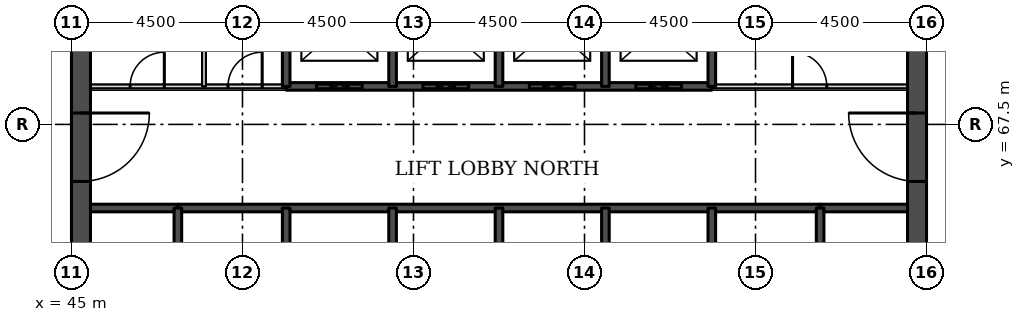
"""IFC4 building model, lengths in metres.
Left out: names, types, materials, properties, quantities, classifications, styles, units other than length and angle.
Written with IfcOpenShell. Run it as: python <this file> out.ifc"""

import sys

from ifc_helpers import new_model, si_unit, direction, frame, frame_2d, origin, place, context, subcontext, project, spatial, rectangle, extrude, element, fill, save


model = new_model("IFC4")
c1 = context("Model", 3, precision=1e-05, world=origin(), true_north=direction((0.0, 1.0)))
c2 = subcontext(c1, "Body", "Model", "MODEL_VIEW")
j1 = project(units=[si_unit("LENGTHUNIT", "METRE"), si_unit("PLANEANGLEUNIT", "RADIAN")], contexts=[c1])
p1 = place(None, origin())
s1 = spatial("IfcSite", under=j1, at=p1, CompositionType="ELEMENT")
p2 = place(p1, origin())
s2 = spatial("IfcBuilding", under=s1, at=p2, CompositionType="ELEMENT")
p3 = place(p2, frame((0.0, 0.0, 18.5)))
s3 = spatial("IfcBuildingStorey", under=s2, at=p3, CompositionType="ELEMENT", Elevation=18.5)
p4 = place(p3, frame((45.25, 49.5, 0.0), z_axis=(0.0, 0.0, 1.0), x_axis=(0.0, 1.0, 0.0)))
e1 = element("IfcWall", 1, at=p4, inside=s3, PredefinedType="SHEAR", context=c2, shape_type="SweptSolid", body=[
    extrude(rectangle(XDim=22.5, YDim=0.5, at=frame_2d((11.25, 0.0))), origin(), (0.0, 0.0, 1.0), 4.6),
])
p5 = place(p4, frame((4.2, 0.0, 0.0)))
e2 = element("IfcOpeningElement", 2, at=p5, cuts=e1, PredefinedType="OPENING", context=c2, shape_type="SweptSolid", body=[
    extrude(rectangle(XDim=1.8, YDim=2.1, at=frame_2d((0.9, 1.05))), frame((0.0, 0.26, 0.0), z_axis=(0.0, -1.0, 0.0), x_axis=(1.0, 0.0, 0.0)), (0.0, 0.0, 1.0), 0.52),
])
p6 = place(p4, frame((6.9, 0.0, 0.0)))
e3 = element("IfcOpeningElement", 3, at=p6, cuts=e1, PredefinedType="OPENING", context=c2, shape_type="SweptSolid", body=[
    extrude(rectangle(XDim=1.1, YDim=2.1, at=frame_2d((0.55, 1.05))), frame((0.0, 0.26, 0.0), z_axis=(0.0, -1.0, 0.0), x_axis=(1.0, 0.0, 0.0)), (0.0, 0.0, 1.0), 0.52),
])
p7 = place(p4, frame((13.6, 0.0, 0.0)))
e4 = element("IfcOpeningElement", 4, at=p7, cuts=e1, PredefinedType="OPENING", context=c2, shape_type="SweptSolid", body=[
    extrude(rectangle(XDim=1.1, YDim=2.1, at=frame_2d((0.55, 1.05))), frame((0.0, 0.26, 0.0), z_axis=(0.0, -1.0, 0.0), x_axis=(1.0, 0.0, 0.0)), (0.0, 0.0, 1.0), 0.52),
])
p8 = place(p4, frame((16.5, 0.0, 0.0)))
e5 = element("IfcOpeningElement", 5, at=p8, cuts=e1, PredefinedType="OPENING", context=c2, shape_type="SweptSolid", body=[
    extrude(rectangle(XDim=1.8, YDim=2.1, at=frame_2d((0.9, 1.05))), frame((0.0, 0.26, 0.0), z_axis=(0.0, -1.0, 0.0), x_axis=(1.0, 0.0, 0.0)), (0.0, 0.0, 1.0), 0.52),
])
p9 = place(p3, frame((67.25, 49.5, 0.0), z_axis=(0.0, 0.0, 1.0), x_axis=(0.0, 1.0, 0.0)))
e6 = element("IfcWall", 6, at=p9, inside=s3, PredefinedType="SHEAR", context=c2, shape_type="SweptSolid", body=[
    extrude(rectangle(XDim=22.5, YDim=0.5, at=frame_2d((11.25, 0.0))), origin(), (0.0, 0.0, 1.0), 4.6),
])
p10 = place(p9, frame((4.2, 0.0, 0.0)))
e7 = element("IfcOpeningElement", 7, at=p10, cuts=e6, PredefinedType="OPENING", context=c2, shape_type="SweptSolid", body=[
    extrude(rectangle(XDim=1.8, YDim=2.1, at=frame_2d((0.9, 1.05))), frame((0.0, 0.26, 0.0), z_axis=(0.0, -1.0, 0.0), x_axis=(1.0, 0.0, 0.0)), (0.0, 0.0, 1.0), 0.52),
])
p11 = place(p9, frame((6.9, 0.0, 0.0)))
e8 = element("IfcOpeningElement", 8, at=p11, cuts=e6, PredefinedType="OPENING", context=c2, shape_type="SweptSolid", body=[
    extrude(rectangle(XDim=1.1, YDim=2.1, at=frame_2d((0.55, 1.05))), frame((0.0, 0.26, 0.0), z_axis=(0.0, -1.0, 0.0), x_axis=(1.0, 0.0, 0.0)), (0.0, 0.0, 1.0), 0.52),
])
p12 = place(p9, frame((13.6, 0.0, 0.0)))
e9 = element("IfcOpeningElement", 9, at=p12, cuts=e6, PredefinedType="OPENING", context=c2, shape_type="SweptSolid", body=[
    extrude(rectangle(XDim=1.1, YDim=2.1, at=frame_2d((0.55, 1.05))), frame((0.0, 0.26, 0.0), z_axis=(0.0, -1.0, 0.0), x_axis=(1.0, 0.0, 0.0)), (0.0, 0.0, 1.0), 0.52),
])
p13 = place(p9, frame((16.5, 0.0, 0.0)))
e10 = element("IfcOpeningElement", 10, at=p13, cuts=e6, PredefinedType="OPENING", context=c2, shape_type="SweptSolid", body=[
    extrude(rectangle(XDim=1.8, YDim=2.1, at=frame_2d((0.9, 1.05))), frame((0.0, 0.26, 0.0), z_axis=(0.0, -1.0, 0.0), x_axis=(1.0, 0.0, 0.0)), (0.0, 0.0, 1.0), 0.52),
])
for number, where, z_axis, x_axis in (
    (11, (45.5, 65.3, 0.0), (0.0, 0.0, 1.0), (1.0, 0.0, 0.0)),
    (12, (64.7, 65.3, 0.0), (0.0, 0.0, 1.0), (1.0, 0.0, 0.0)),
):
    element("IfcWall", number, at=place(p3, frame(where, z_axis=z_axis, x_axis=x_axis)), inside=s3, PredefinedType="SOLIDWALL", context=c2, shape_type="SweptSolid", body=[
        extrude(rectangle(XDim=2.3, YDim=0.2, at=frame_2d((1.15, 0.0))), origin(), (0.0, 0.0, 1.0), 4.38),
    ])
p14 = place(p3, frame((47.8, 65.3, 0.0), z_axis=(0.0, 0.0, 1.0), x_axis=(1.0, 0.0, 0.0)))
e13 = element("IfcWall", 13, at=p14, inside=s3, PredefinedType="SOLIDWALL", context=c2, shape_type="SweptSolid", body=[
    extrude(rectangle(XDim=16.9, YDim=0.2, at=frame_2d((8.45, 0.0))), origin(), (0.0, 0.0, 1.0), 4.38),
])
p15 = place(p3, frame((45.5, 68.5, 0.0), z_axis=(0.0, 0.0, 1.0), x_axis=(1.0, 0.0, 0.0)))
e14 = element("IfcWall", 14, at=p15, inside=s3, PredefinedType="PARTITIONING", context=c2, shape_type="SweptSolid", body=[
    extrude(rectangle(XDim=5.15, YDim=0.1, at=frame_2d((2.575, 0.0))), origin(), (0.0, 0.0, 1.0), 4.38),
])
p16 = place(p15, frame((1.043, 0.0, 0.0)))
e15 = element("IfcOpeningElement", 15, at=p16, cuts=e14, PredefinedType="OPENING", context=c2, shape_type="SweptSolid", body=[
    extrude(rectangle(XDim=0.9, YDim=2.1, at=frame_2d((0.45, 1.05))), frame((0.0, 0.06, 0.0), z_axis=(0.0, -1.0, 0.0), x_axis=(1.0, 0.0, 0.0)), (0.0, 0.0, 1.0), 0.12),
])
p17 = place(p15, frame((3.618, 0.0, 0.0)))
e16 = element("IfcOpeningElement", 16, at=p17, cuts=e14, PredefinedType="OPENING", context=c2, shape_type="SweptSolid", body=[
    extrude(rectangle(XDim=0.9, YDim=2.1, at=frame_2d((0.45, 1.05))), frame((0.0, 0.06, 0.0), z_axis=(0.0, -1.0, 0.0), x_axis=(1.0, 0.0, 0.0)), (0.0, 0.0, 1.0), 0.12),
])
p18 = place(p3, frame((61.85, 68.5, 0.0), z_axis=(0.0, 0.0, 1.0), x_axis=(1.0, 0.0, 0.0)))
e17 = element("IfcWall", 17, at=p18, inside=s3, PredefinedType="PARTITIONING", context=c2, shape_type="SweptSolid", body=[
    extrude(rectangle(XDim=5.15, YDim=0.1, at=frame_2d((2.575, 0.0))), origin(), (0.0, 0.0, 1.0), 4.38),
])
p19 = place(p18, frame((2.125, 0.0, 0.0)))
e18 = element("IfcOpeningElement", 18, at=p19, cuts=e17, PredefinedType="OPENING", context=c2, shape_type="SweptSolid", body=[
    extrude(rectangle(XDim=0.9, YDim=2.1, at=frame_2d((0.45, 1.05))), frame((0.0, 0.06, 0.0), z_axis=(0.0, -1.0, 0.0), x_axis=(1.0, 0.0, 0.0)), (0.0, 0.0, 1.0), 0.12),
])
p20 = place(p3, frame((50.65, 68.5, 0.0), z_axis=(0.0, 0.0, 1.0), x_axis=(1.0, 0.0, 0.0)))
e19 = element("IfcWall", 19, at=p20, inside=s3, PredefinedType="SOLIDWALL", context=c2, shape_type="SweptSolid", body=[
    extrude(rectangle(XDim=11.2, YDim=0.2, at=frame_2d((5.6, 0.0))), origin(), (0.0, 0.0, 1.0), 4.38),
])
p21 = place(p20, frame((0.8, 0.0, 0.0)))
e20 = element("IfcOpeningElement", 20, at=p21, cuts=e19, PredefinedType="OPENING", context=c2, shape_type="SweptSolid", body=[
    extrude(rectangle(XDim=1.2, YDim=2.1, at=frame_2d((0.6, 1.05))), frame((0.0, 0.11, 0.0), z_axis=(0.0, -1.0, 0.0), x_axis=(1.0, 0.0, 0.0)), (0.0, 0.0, 1.0), 0.22),
])
p22 = place(p20, frame((3.6, 0.0, 0.0)))
e21 = element("IfcOpeningElement", 21, at=p22, cuts=e19, PredefinedType="OPENING", context=c2, shape_type="SweptSolid", body=[
    extrude(rectangle(XDim=1.2, YDim=2.1, at=frame_2d((0.6, 1.05))), frame((0.0, 0.11, 0.0), z_axis=(0.0, -1.0, 0.0), x_axis=(1.0, 0.0, 0.0)), (0.0, 0.0, 1.0), 0.22),
])
p23 = place(p20, frame((6.4, 0.0, 0.0)))
e22 = element("IfcOpeningElement", 22, at=p23, cuts=e19, PredefinedType="OPENING", context=c2, shape_type="SweptSolid", body=[
    extrude(rectangle(XDim=1.2, YDim=2.1, at=frame_2d((0.6, 1.05))), frame((0.0, 0.11, 0.0), z_axis=(0.0, -1.0, 0.0), x_axis=(1.0, 0.0, 0.0)), (0.0, 0.0, 1.0), 0.22),
])
p24 = place(p20, frame((9.2, 0.0, 0.0)))
e23 = element("IfcOpeningElement", 23, at=p24, cuts=e19, PredefinedType="OPENING", context=c2, shape_type="SweptSolid", body=[
    extrude(rectangle(XDim=1.2, YDim=2.1, at=frame_2d((0.6, 1.05))), frame((0.0, 0.11, 0.0), z_axis=(0.0, -1.0, 0.0), x_axis=(1.0, 0.0, 0.0)), (0.0, 0.0, 1.0), 0.22),
])
p25 = place(p3, frame((47.8, 62.0, 0.0), z_axis=(0.0, 0.0, 1.0), x_axis=(0.0, 1.0, 0.0)))
e24 = element("IfcWall", 24, at=p25, inside=s3, PredefinedType="SOLIDWALL", context=c2, shape_type="SweptSolid", body=[
    extrude(rectangle(XDim=3.3, YDim=0.2, at=frame_2d((1.65, 0.0))), origin(), (0.0, 0.0, 1.0), 4.38),
])
p26 = place(p25, frame((1.1, 0.0, 0.0)))
e25 = element("IfcOpeningElement", 25, at=p26, cuts=e24, PredefinedType="OPENING", context=c2, shape_type="SweptSolid", body=[
    extrude(rectangle(XDim=1.1, YDim=2.1, at=frame_2d((0.55, 1.05))), frame((0.0, 0.11, 0.0), z_axis=(0.0, -1.0, 0.0), x_axis=(1.0, 0.0, 0.0)), (0.0, 0.0, 1.0), 0.22),
])
p27 = place(p3, frame((48.487, 68.5, 0.0), z_axis=(0.0, 0.0, 1.0), x_axis=(0.0, 1.0, 0.0)))
e26 = element("IfcWall", 26, at=p27, inside=s3, PredefinedType="PARTITIONING", context=c2, shape_type="SweptSolid", body=[
    extrude(rectangle(XDim=3.0, YDim=0.1, at=frame_2d((1.5, 0.0))), origin(), (0.0, 0.0, 1.0), 4.38),
])
p28 = place(p3, frame((50.65, 62.0, 0.0), z_axis=(0.0, 0.0, 1.0), x_axis=(0.0, 1.0, 0.0)))
e27 = element("IfcWall", 27, at=p28, inside=s3, PredefinedType="SOLIDWALL", context=c2, shape_type="SweptSolid", body=[
    extrude(rectangle(XDim=3.3, YDim=0.2, at=frame_2d((1.65, 0.0))), origin(), (0.0, 0.0, 1.0), 4.38),
])
p29 = place(p3, frame((50.65, 68.5, 0.0), z_axis=(0.0, 0.0, 1.0), x_axis=(0.0, 1.0, 0.0)))
e28 = element("IfcWall", 28, at=p29, inside=s3, PredefinedType="SOLIDWALL", context=c2, shape_type="SweptSolid", body=[
    extrude(rectangle(XDim=3.0, YDim=0.2, at=frame_2d((1.5, 0.0))), origin(), (0.0, 0.0, 1.0), 4.38),
])
p30 = place(p3, frame((53.45, 62.5, 0.0), z_axis=(0.0, 0.0, 1.0), x_axis=(0.0, 1.0, 0.0)))
e29 = element("IfcWall", 29, at=p30, inside=s3, PredefinedType="SOLIDWALL", context=c2, shape_type="SweptSolid", body=[
    extrude(rectangle(XDim=2.8, YDim=0.2, at=frame_2d((1.4, 0.0))), origin(), (0.0, 0.0, 1.0), 4.38),
])
p31 = place(p3, frame((53.45, 68.5, 0.0), z_axis=(0.0, 0.0, 1.0), x_axis=(0.0, 1.0, 0.0)))
e30 = element("IfcWall", 30, at=p31, inside=s3, PredefinedType="SOLIDWALL", context=c2, shape_type="SweptSolid", body=[
    extrude(rectangle(XDim=3.0, YDim=0.2, at=frame_2d((1.5, 0.0))), origin(), (0.0, 0.0, 1.0), 4.38),
])
p32 = place(p3, frame((56.25, 62.5, 0.0), z_axis=(0.0, 0.0, 1.0), x_axis=(0.0, 1.0, 0.0)))
e31 = element("IfcWall", 31, at=p32, inside=s3, PredefinedType="SOLIDWALL", context=c2, shape_type="SweptSolid", body=[
    extrude(rectangle(XDim=2.8, YDim=0.2, at=frame_2d((1.4, 0.0))), origin(), (0.0, 0.0, 1.0), 4.38),
])
p33 = place(p3, frame((56.25, 68.5, 0.0), z_axis=(0.0, 0.0, 1.0), x_axis=(0.0, 1.0, 0.0)))
e32 = element("IfcWall", 32, at=p33, inside=s3, PredefinedType="SOLIDWALL", context=c2, shape_type="SweptSolid", body=[
    extrude(rectangle(XDim=3.0, YDim=0.2, at=frame_2d((1.5, 0.0))), origin(), (0.0, 0.0, 1.0), 4.38),
])
p34 = place(p3, frame((59.05, 62.5, 0.0), z_axis=(0.0, 0.0, 1.0), x_axis=(0.0, 1.0, 0.0)))
e33 = element("IfcWall", 33, at=p34, inside=s3, PredefinedType="SOLIDWALL", context=c2, shape_type="SweptSolid", body=[
    extrude(rectangle(XDim=2.8, YDim=0.2, at=frame_2d((1.4, 0.0))), origin(), (0.0, 0.0, 1.0), 4.38),
])
p35 = place(p3, frame((59.05, 68.5, 0.0), z_axis=(0.0, 0.0, 1.0), x_axis=(0.0, 1.0, 0.0)))
e34 = element("IfcWall", 34, at=p35, inside=s3, PredefinedType="SOLIDWALL", context=c2, shape_type="SweptSolid", body=[
    extrude(rectangle(XDim=3.0, YDim=0.2, at=frame_2d((1.5, 0.0))), origin(), (0.0, 0.0, 1.0), 4.38),
])
p36 = place(p3, frame((61.85, 62.0, 0.0), z_axis=(0.0, 0.0, 1.0), x_axis=(0.0, 1.0, 0.0)))
e35 = element("IfcWall", 35, at=p36, inside=s3, PredefinedType="SOLIDWALL", context=c2, shape_type="SweptSolid", body=[
    extrude(rectangle(XDim=3.3, YDim=0.2, at=frame_2d((1.65, 0.0))), origin(), (0.0, 0.0, 1.0), 4.38),
])
p37 = place(p3, frame((61.85, 68.5, 0.0), z_axis=(0.0, 0.0, 1.0), x_axis=(0.0, 1.0, 0.0)))
e36 = element("IfcWall", 36, at=p37, inside=s3, PredefinedType="SOLIDWALL", context=c2, shape_type="SweptSolid", body=[
    extrude(rectangle(XDim=3.0, YDim=0.2, at=frame_2d((1.5, 0.0))), origin(), (0.0, 0.0, 1.0), 4.38),
])
p38 = place(p3, frame((64.7, 62.0, 0.0), z_axis=(0.0, 0.0, 1.0), x_axis=(0.0, 1.0, 0.0)))
e37 = element("IfcWall", 37, at=p38, inside=s3, PredefinedType="SOLIDWALL", context=c2, shape_type="SweptSolid", body=[
    extrude(rectangle(XDim=3.3, YDim=0.2, at=frame_2d((1.65, 0.0))), origin(), (0.0, 0.0, 1.0), 4.38),
])
p39 = place(p38, frame((1.1, 0.0, 0.0)))
e38 = element("IfcOpeningElement", 38, at=p39, cuts=e37, PredefinedType="OPENING", context=c2, shape_type="SweptSolid", body=[
    extrude(rectangle(XDim=1.1, YDim=2.1, at=frame_2d((0.55, 1.05))), frame((0.0, 0.11, 0.0), z_axis=(0.0, -1.0, 0.0), x_axis=(1.0, 0.0, 0.0)), (0.0, 0.0, 1.0), 0.22),
])
p40 = place(p21, origin())
e39 = element("IfcDoor", 39, at=p40, inside=s3, OperationType="DOUBLE_DOOR_SLIDING", PredefinedType="DOOR", context=c2, shape_type="SweptSolid", body=[
    extrude(rectangle(XDim=1.2, YDim=2.1, at=frame_2d((0.6, 1.05))), frame((0.0, 0.025, 0.0), z_axis=(0.0, -1.0, 0.0), x_axis=(1.0, 0.0, 0.0)), (0.0, 0.0, 1.0), 0.05),
])
fill(e20, e39)
p41 = place(p22, origin())
e40 = element("IfcDoor", 40, at=p41, inside=s3, OperationType="DOUBLE_DOOR_SLIDING", PredefinedType="DOOR", context=c2, shape_type="SweptSolid", body=[
    extrude(rectangle(XDim=1.2, YDim=2.1, at=frame_2d((0.6, 1.05))), frame((0.0, 0.025, 0.0), z_axis=(0.0, -1.0, 0.0), x_axis=(1.0, 0.0, 0.0)), (0.0, 0.0, 1.0), 0.05),
])
fill(e21, e40)
p42 = place(p23, origin())
e41 = element("IfcDoor", 41, at=p42, inside=s3, OperationType="DOUBLE_DOOR_SLIDING", PredefinedType="DOOR", context=c2, shape_type="SweptSolid", body=[
    extrude(rectangle(XDim=1.2, YDim=2.1, at=frame_2d((0.6, 1.05))), frame((0.0, 0.025, 0.0), z_axis=(0.0, -1.0, 0.0), x_axis=(1.0, 0.0, 0.0)), (0.0, 0.0, 1.0), 0.05),
])
fill(e22, e41)
p43 = place(p24, origin())
e42 = element("IfcDoor", 42, at=p43, inside=s3, OperationType="DOUBLE_DOOR_SLIDING", PredefinedType="DOOR", context=c2, shape_type="SweptSolid", body=[
    extrude(rectangle(XDim=1.2, YDim=2.1, at=frame_2d((0.6, 1.05))), frame((0.0, 0.025, 0.0), z_axis=(0.0, -1.0, 0.0), x_axis=(1.0, 0.0, 0.0)), (0.0, 0.0, 1.0), 0.05),
])
fill(e23, e42)
p44 = place(p8, frame((1.8, 0.0, 0.0), z_axis=(0.0, 0.0, 1.0), x_axis=(-1.0, 0.0, 0.0)))
e43 = element("IfcDoor", 43, at=p44, inside=s3, OperationType="SINGLE_SWING_LEFT", PredefinedType="DOOR", context=c2, shape_type="SweptSolid", body=[
    extrude(rectangle(XDim=1.8, YDim=2.1, at=frame_2d((0.9, 1.05))), frame((0.0, 0.025, 0.0), z_axis=(0.0, -1.0, 0.0), x_axis=(1.0, 0.0, 0.0)), (0.0, 0.0, 1.0), 0.05),
])
fill(e5, e43)
p45 = place(p13, origin())
e44 = element("IfcDoor", 44, at=p45, inside=s3, OperationType="SINGLE_SWING_RIGHT", PredefinedType="DOOR", context=c2, shape_type="SweptSolid", body=[
    extrude(rectangle(XDim=1.8, YDim=2.1, at=frame_2d((0.9, 1.05))), frame((0.0, 0.025, 0.0), z_axis=(0.0, -1.0, 0.0), x_axis=(1.0, 0.0, 0.0)), (0.0, 0.0, 1.0), 0.05),
])
fill(e10, e44)
p46 = place(p19, origin())
e45 = element("IfcDoor", 45, at=p46, inside=s3, OperationType="SINGLE_SWING_LEFT", PredefinedType="DOOR", context=c2, shape_type="SweptSolid", body=[
    extrude(rectangle(XDim=0.9, YDim=2.1, at=frame_2d((0.45, 1.05))), frame((0.0, 0.025, 0.0), z_axis=(0.0, -1.0, 0.0), x_axis=(1.0, 0.0, 0.0)), (0.0, 0.0, 1.0), 0.05),
])
fill(e18, e45)
p47 = place(p16, origin())
e46 = element("IfcDoor", 46, at=p47, inside=s3, OperationType="SINGLE_SWING_RIGHT", PredefinedType="DOOR", context=c2, shape_type="SweptSolid", body=[
    extrude(rectangle(XDim=0.9, YDim=2.1, at=frame_2d((0.45, 1.05))), frame((0.0, 0.025, 0.0), z_axis=(0.0, -1.0, 0.0), x_axis=(1.0, 0.0, 0.0)), (0.0, 0.0, 1.0), 0.05),
])
fill(e15, e46)
p48 = place(p17, origin())
e47 = element("IfcDoor", 47, at=p48, inside=s3, OperationType="SINGLE_SWING_RIGHT", PredefinedType="DOOR", context=c2, shape_type="SweptSolid", body=[
    extrude(rectangle(XDim=0.9, YDim=2.1, at=frame_2d((0.45, 1.05))), frame((0.0, 0.025, 0.0), z_axis=(0.0, -1.0, 0.0), x_axis=(1.0, 0.0, 0.0)), (0.0, 0.0, 1.0), 0.05),
])
fill(e16, e47)
save(model, sys.argv[1])
